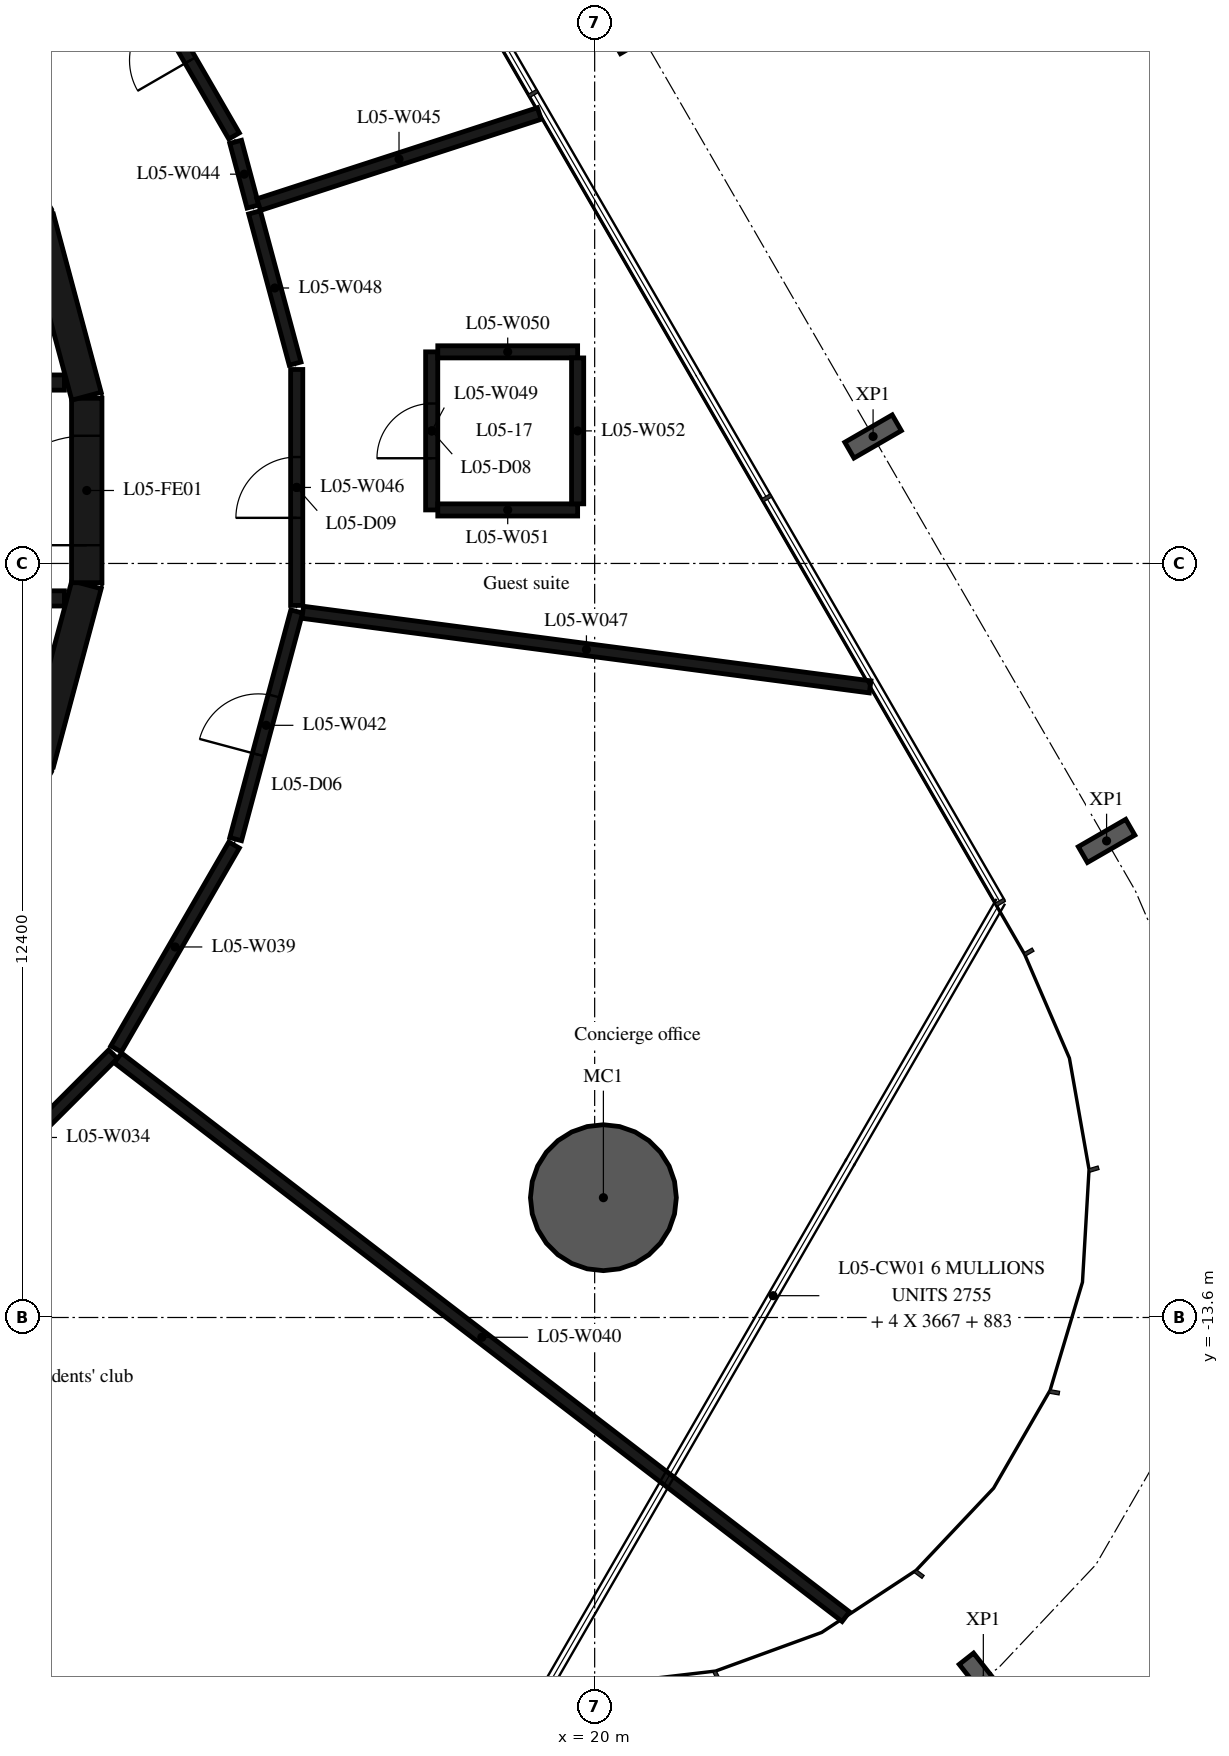
"""IFC4 building model, lengths in metres.
Left out: names, types, materials, properties, quantities, classifications, styles, units other than length and angle.
Written with IfcOpenShell. Run it as: python <this file> out.ifc"""

import sys

from ifc_helpers import new_model, si_unit, direction, frame, frame_2d, origin, origin_2d, place, context, subcontext, project, spatial, rectangle, hollow_circle, i_section, extrude, element, fill, save


model = new_model("IFC4")
c1 = context("Model", 3, precision=1e-05, world=origin(), true_north=direction((0.0, 1.0)))
c2 = subcontext(c1, "Body", "Model", "MODEL_VIEW")
j1 = project(units=[si_unit("LENGTHUNIT", "METRE"), si_unit("PLANEANGLEUNIT", "RADIAN")], contexts=[c1])
p1 = place(None, origin())
s1 = spatial("IfcSite", under=j1, at=p1, CompositionType="ELEMENT")
p2 = place(p1, origin())
s2 = spatial("IfcBuilding", under=s1, at=p2, CompositionType="ELEMENT")
p3 = place(p2, frame((0.0, 0.0, 28.2)))
s3 = spatial("IfcBuildingStorey", under=s2, at=p3, CompositionType="ELEMENT", Elevation=28.2)
p4 = place(p3, frame((20.144, -11.63, -0.38), z_axis=(0.0, 0.0, 1.0), x_axis=(1.0, 0.0, 0.0)))
e1 = element("IfcColumn", 1, at=p4, inside=s3, PredefinedType="COLUMN", context=c2, shape_type="SweptSolid", body=[
    extrude(hollow_circle(Radius=1.2, WallThickness=0.06, at=origin_2d()), origin(), (0.0, 0.0, 1.0), 4.73),
])
for number, where, z_axis, x_axis in (
    (2, (26.392, -19.565, -0.38), (0.0, 0.0, 1.0), (-0.786, -0.619, 0.0)),
    (3, (28.419, -5.763, -0.38), (0.0, 0.0, 1.0), (0.5, -0.866, 0.0)),
    (4, (24.579, 0.888, -0.38), (0.0, 0.0, 1.0), (0.5, -0.866, 0.0)),
    (5, (20.739, 7.539, -0.38), (0.0, 0.0, 1.0), (0.5, -0.866, 0.0)),
):
    element("IfcColumn", number, at=place(p3, frame(where, z_axis=z_axis, x_axis=x_axis)), inside=s3, PredefinedType="COLUMN", context=c2, shape_type="SweptSolid", body=[
        extrude(i_section(OverallWidth=0.3, OverallDepth=0.9, WebThickness=0.019, FlangeThickness=0.035, FilletRadius=0.03, at=origin_2d()), origin(), (0.0, 0.0, 1.0), 4.73),
    ])
p5 = place(p3, frame((10.858, -4.479, 0.0), z_axis=(0.0, 0.0, 1.0), x_axis=(0.258734743916, 0.965948410781, 0.0)))
e6 = element("IfcWall", 6, at=p5, inside=s3, PredefinedType="SHEAR", context=c2, shape_type="SweptSolid", body=[
    extrude(rectangle(XDim=3.033, YDim=0.5, at=frame_2d((1.516, 0.0))), origin(), (0.0, 0.0, 1.0), 4.35),
])
p6 = place(p3, frame((11.647, -1.516, 0.0), z_axis=(0.0, 0.0, 1.0), x_axis=(0.0, 1.0, 0.0)))
e7 = element("IfcWall", 7, at=p6, inside=s3, PredefinedType="SHEAR", context=c2, shape_type="SweptSolid", body=[
    extrude(rectangle(XDim=3.033, YDim=0.5, at=frame_2d((1.516, 0.0))), origin(), (0.0, 0.0, 1.0), 4.35),
])
p7 = place(p6, frame((0.616, 0.0, 0.0)))
e8 = element("IfcOpeningElement", 8, at=p7, cuts=e7, PredefinedType="OPENING", context=c2, shape_type="SweptSolid", body=[
    extrude(rectangle(XDim=1.8, YDim=2.1, at=frame_2d((0.9, 1.05))), frame((0.0, 0.26, 0.0), z_axis=(0.0, -1.0, 0.0), x_axis=(1.0, 0.0, 0.0)), (0.0, 0.0, 1.0), 0.52),
])
p8 = place(p3, frame((11.643, 1.55, 0.0), z_axis=(0.0, 0.0, 1.0), x_axis=(-0.258734743916, 0.965948410781, 0.0)))
e9 = element("IfcWall", 9, at=p8, inside=s3, PredefinedType="SHEAR", context=c2, shape_type="SweptSolid", body=[
    extrude(rectangle(XDim=3.033, YDim=0.5, at=frame_2d((1.516, 0.0))), origin(), (0.0, 0.0, 1.0), 4.35),
])
p9 = place(p3, frame((3.35, 1.775, 0.0), z_axis=(0.0, 0.0, 1.0), x_axis=(1.0, 0.0, 0.0)))
e10 = element("IfcWall", 10, at=p9, inside=s3, PredefinedType="SHEAR", context=c2, shape_type="SweptSolid", body=[
    extrude(rectangle(XDim=7.93, YDim=0.25, at=frame_2d((3.965, 0.0))), origin(), (0.0, 0.0, 1.0), 4.35),
])
p10 = place(p9, frame((0.35, 0.0, 0.0)))
e11 = element("IfcOpeningElement", 11, at=p10, cuts=e10, PredefinedType="OPENING", context=c2, shape_type="SweptSolid", body=[
    extrude(rectangle(XDim=1.2, YDim=2.4, at=frame_2d((0.6, 1.2))), frame((0.0, 0.135, 0.0), z_axis=(0.0, -1.0, 0.0), x_axis=(1.0, 0.0, 0.0)), (0.0, 0.0, 1.0), 0.27),
])
p11 = place(p9, frame((2.5, 0.0, 0.0)))
e12 = element("IfcOpeningElement", 12, at=p11, cuts=e10, PredefinedType="OPENING", context=c2, shape_type="SweptSolid", body=[
    extrude(rectangle(XDim=1.2, YDim=2.4, at=frame_2d((0.6, 1.2))), frame((0.0, 0.135, 0.0), z_axis=(0.0, -1.0, 0.0), x_axis=(1.0, 0.0, 0.0)), (0.0, 0.0, 1.0), 0.27),
])
p12 = place(p9, frame((4.8, 0.0, 0.0)))
e13 = element("IfcOpeningElement", 13, at=p12, cuts=e10, PredefinedType="OPENING", context=c2, shape_type="SweptSolid", body=[
    extrude(rectangle(XDim=0.9, YDim=2.1, at=frame_2d((0.45, 1.05))), frame((0.0, 0.135, 0.0), z_axis=(0.0, -1.0, 0.0), x_axis=(1.0, 0.0, 0.0)), (0.0, 0.0, 1.0), 0.27),
])
p13 = place(p3, frame((3.35, -1.775, 0.0), z_axis=(0.0, 0.0, 1.0), x_axis=(1.0, 0.0, 0.0)))
e14 = element("IfcWall", 14, at=p13, inside=s3, PredefinedType="SHEAR", context=c2, shape_type="SweptSolid", body=[
    extrude(rectangle(XDim=7.93, YDim=0.25, at=frame_2d((3.965, 0.0))), origin(), (0.0, 0.0, 1.0), 4.35),
])
p14 = place(p13, frame((0.4, 0.0, 0.0)))
e15 = element("IfcOpeningElement", 15, at=p14, cuts=e14, PredefinedType="OPENING", context=c2, shape_type="SweptSolid", body=[
    extrude(rectangle(XDim=1.1, YDim=2.4, at=frame_2d((0.55, 1.2))), frame((0.0, 0.135, 0.0), z_axis=(0.0, -1.0, 0.0), x_axis=(1.0, 0.0, 0.0)), (0.0, 0.0, 1.0), 0.27),
])
p15 = place(p13, frame((2.55, 0.0, 0.0)))
e16 = element("IfcOpeningElement", 16, at=p15, cuts=e14, PredefinedType="OPENING", context=c2, shape_type="SweptSolid", body=[
    extrude(rectangle(XDim=1.1, YDim=2.4, at=frame_2d((0.55, 1.2))), frame((0.0, 0.135, 0.0), z_axis=(0.0, -1.0, 0.0), x_axis=(1.0, 0.0, 0.0)), (0.0, 0.0, 1.0), 0.27),
])
p16 = place(p13, frame((4.7, 0.0, 0.0)))
e17 = element("IfcOpeningElement", 17, at=p16, cuts=e14, PredefinedType="OPENING", context=c2, shape_type="SweptSolid", body=[
    extrude(rectangle(XDim=1.1, YDim=2.4, at=frame_2d((0.55, 1.2))), frame((0.0, 0.135, 0.0), z_axis=(0.0, -1.0, 0.0), x_axis=(1.0, 0.0, 0.0)), (0.0, 0.0, 1.0), 0.27),
])
p17 = place(p3, frame((9.341, -12.009, 0.0), z_axis=(0.0, 0.0, 1.0), x_axis=(0.707106781187, 0.707106781187, 0.0)))
e18 = element("IfcWall", 18, at=p17, inside=s3, PredefinedType="PARTITIONING", context=c2, shape_type="SweptSolid", body=[
    extrude(rectangle(XDim=3.874, YDim=0.2, at=frame_2d((1.937, 0.0))), origin(), (0.0, 0.0, 1.0), 4.35),
])
p18 = place(p3, frame((12.13, -9.183, 0.0), z_axis=(0.0, 0.0, 1.0), x_axis=(0.500760497952, 0.865585884642, 0.0)))
e19 = element("IfcWall", 19, at=p18, inside=s3, PredefinedType="PARTITIONING", context=c2, shape_type="SweptSolid", body=[
    extrude(rectangle(XDim=3.874, YDim=0.2, at=frame_2d((1.937, 0.0))), origin(), (0.0, 0.0, 1.0), 4.35),
])
p19 = place(p3, frame((12.159, -9.331, 0.0), z_axis=(0.0, 0.0, 1.0), x_axis=(0.793226820575, -0.608926277246, 0.0)))
e20 = element("IfcWall", 20, at=p19, inside=s3, PredefinedType="PARTITIONING", context=c2, shape_type="SweptSolid", body=[
    extrude(rectangle(XDim=15.091, YDim=0.2, at=frame_2d((7.545, 0.0))), origin(), (0.0, 0.0, 1.0), 4.35),
])
p20 = place(p3, frame((14.096, -5.733, 0.0), z_axis=(0.0, 0.0, 1.0), x_axis=(0.259085569159, 0.96585437197, 0.0)))
e21 = element("IfcWall", 21, at=p20, inside=s3, PredefinedType="PARTITIONING", context=c2, shape_type="SweptSolid", body=[
    extrude(rectangle(XDim=3.876, YDim=0.2, at=frame_2d((1.938, 0.0))), origin(), (0.0, 0.0, 1.0), 4.35),
])
p21 = place(p20, frame((1.438, 0.0, 0.0)))
e22 = element("IfcOpeningElement", 22, at=p21, cuts=e21, PredefinedType="OPENING", context=c2, shape_type="SweptSolid", body=[
    extrude(rectangle(XDim=1.0, YDim=2.1, at=frame_2d((0.5, 1.05))), frame((0.0, 0.11, 0.0), z_axis=(0.0, -1.0, 0.0), x_axis=(1.0, 0.0, 0.0)), (0.0, 0.0, 1.0), 0.22),
])
p22 = place(p3, frame((14.07, 5.83, 0.0), z_axis=(0.0, 0.0, 1.0), x_axis=(-0.500760497952, 0.865585884642, 0.0)))
e23 = element("IfcWall", 23, at=p22, inside=s3, PredefinedType="PARTITIONING", context=c2, shape_type="SweptSolid", body=[
    extrude(rectangle(XDim=3.874, YDim=0.2, at=frame_2d((1.937, 0.0))), origin(), (0.0, 0.0, 1.0), 4.35),
])
p23 = place(p22, frame((1.437, 0.0, 0.0)))
e24 = element("IfcOpeningElement", 24, at=p23, cuts=e23, PredefinedType="OPENING", context=c2, shape_type="SweptSolid", body=[
    extrude(rectangle(XDim=1.0, YDim=2.1, at=frame_2d((0.5, 1.05))), frame((0.0, 0.11, 0.0), z_axis=(0.0, -1.0, 0.0), x_axis=(1.0, 0.0, 0.0)), (0.0, 0.0, 1.0), 0.22),
])
p24 = place(p3, frame((14.38, 4.67, 0.0), z_axis=(0.0, 0.0, 1.0), x_axis=(-0.258159565639, 0.966102292032, 0.0)))
e25 = element("IfcWall", 25, at=p24, inside=s3, PredefinedType="PARTITIONING", context=c2, shape_type="SweptSolid", body=[
    extrude(rectangle(XDim=1.101, YDim=0.2, at=frame_2d((0.55, 0.0))), origin(), (0.0, 0.0, 1.0), 4.35),
])
p25 = place(p3, frame((14.475, 4.701, 0.0), z_axis=(0.0, 0.0, 1.0), x_axis=(0.951085450377, 0.308927930239, 0.0)))
e26 = element("IfcWall", 26, at=p25, inside=s3, PredefinedType="PARTITIONING", context=c2, shape_type="SweptSolid", body=[
    extrude(rectangle(XDim=4.852, YDim=0.2, at=frame_2d((2.426, 0.0))), origin(), (0.0, 0.0, 1.0), 3.96),
])
p26 = place(p3, frame((15.1, -1.89, 0.0), z_axis=(0.0, 0.0, 1.0), x_axis=(0.0, 1.0, 0.0)))
e27 = element("IfcWall", 27, at=p26, inside=s3, PredefinedType="PARTITIONING", context=c2, shape_type="SweptSolid", body=[
    extrude(rectangle(XDim=3.88, YDim=0.2, at=frame_2d((1.94, 0.0))), origin(), (0.0, 0.0, 1.0), 4.35),
])
p27 = place(p26, frame((1.44, 0.0, 0.0)))
e28 = element("IfcOpeningElement", 28, at=p27, cuts=e27, PredefinedType="OPENING", context=c2, shape_type="SweptSolid", body=[
    extrude(rectangle(XDim=1.0, YDim=2.1, at=frame_2d((0.5, 1.05))), frame((0.0, 0.11, 0.0), z_axis=(0.0, -1.0, 0.0), x_axis=(1.0, 0.0, 0.0)), (0.0, 0.0, 1.0), 0.22),
])
p28 = place(p3, frame((15.199, -2.003, 0.0), z_axis=(0.0, 0.0, 1.0), x_axis=(0.991463740717, -0.130382709146, 0.0)))
e29 = element("IfcWall", 29, at=p28, inside=s3, PredefinedType="PARTITIONING", context=c2, shape_type="SweptSolid", body=[
    extrude(rectangle(XDim=9.411, YDim=0.2, at=frame_2d((4.706, 0.0))), origin(), (0.0, 0.0, 1.0), 4.35),
])
p29 = place(p3, frame((15.074, 2.087, 0.0), z_axis=(0.0, 0.0, 1.0), x_axis=(-0.259408996071, 0.965767556277, 0.0)))
e30 = element("IfcWall", 30, at=p29, inside=s3, PredefinedType="PARTITIONING", context=c2, shape_type="SweptSolid", body=[
    extrude(rectangle(XDim=2.575, YDim=0.2, at=frame_2d((1.288, 0.0))), origin(), (0.0, 0.0, 1.0), 4.35),
])
p30 = place(p3, frame((17.32, -0.32, 0.0), z_axis=(0.0, 0.0, 1.0), x_axis=(0.0, 1.0, 0.0)))
e31 = element("IfcWall", 31, at=p30, inside=s3, PredefinedType="PARTITIONING", context=c2, shape_type="SweptSolid", body=[
    extrude(rectangle(XDim=2.6, YDim=0.2, at=frame_2d((1.3, 0.0))), origin(), (0.0, 0.0, 1.0), 4.35),
])
p31 = place(p30, frame((0.85, 0.0, 0.0)))
e32 = element("IfcOpeningElement", 32, at=p31, cuts=e31, PredefinedType="OPENING", context=c2, shape_type="SweptSolid", body=[
    extrude(rectangle(XDim=0.9, YDim=2.1, at=frame_2d((0.45, 1.05))), frame((0.0, 0.11, 0.0), z_axis=(0.0, -1.0, 0.0), x_axis=(1.0, 0.0, 0.0)), (0.0, 0.0, 1.0), 0.22),
])
for number, where, z_axis, x_axis in (
    (33, (17.42, 2.28, 0.0), (0.0, 0.0, 1.0), (1.0, 0.0, 0.0)),
    (34, (19.72, -0.32, 0.0), (0.0, 0.0, 1.0), (-1.0, 0.0, 0.0)),
):
    element("IfcWall", number, at=place(p3, frame(where, z_axis=z_axis, x_axis=x_axis)), inside=s3, PredefinedType="PARTITIONING", context=c2, shape_type="SweptSolid", body=[
        extrude(rectangle(XDim=2.3, YDim=0.2, at=frame_2d((1.15, 0.0))), origin(), (0.0, 0.0, 1.0), 4.35),
    ])
p32 = place(p3, frame((19.72, 2.18, 0.0), z_axis=(0.0, 0.0, 1.0), x_axis=(0.0, -1.0, 0.0)))
e35 = element("IfcWall", 35, at=p32, inside=s3, PredefinedType="PARTITIONING", context=c2, shape_type="SweptSolid", body=[
    extrude(rectangle(XDim=2.4, YDim=0.2, at=frame_2d((1.2, 0.0))), origin(), (0.0, 0.0, 1.0), 4.35),
])
p33 = place(p7, origin())
e36 = element("IfcDoor", 36, at=p33, inside=s3, OperationType="DOUBLE_DOOR_SINGLE_SWING", PredefinedType="DOOR", context=c2, shape_type="SweptSolid", body=[
    extrude(rectangle(XDim=1.8, YDim=2.1, at=frame_2d((0.9, 1.05))), frame((0.0, 0.025, 0.0), z_axis=(0.0, -1.0, 0.0), x_axis=(1.0, 0.0, 0.0)), (0.0, 0.0, 1.0), 0.05),
])
fill(e8, e36)
p34 = place(p21, origin())
e37 = element("IfcDoor", 37, at=p34, inside=s3, OperationType="SINGLE_SWING_LEFT", PredefinedType="DOOR", context=c2, shape_type="SweptSolid", body=[
    extrude(rectangle(XDim=1.0, YDim=2.1, at=frame_2d((0.5, 1.05))), frame((0.0, 0.025, 0.0), z_axis=(0.0, -1.0, 0.0), x_axis=(1.0, 0.0, 0.0)), (0.0, 0.0, 1.0), 0.05),
])
fill(e22, e37)
p35 = place(p31, origin())
e38 = element("IfcDoor", 38, at=p35, inside=s3, OperationType="SINGLE_SWING_LEFT", PredefinedType="DOOR", context=c2, shape_type="SweptSolid", body=[
    extrude(rectangle(XDim=0.9, YDim=2.1, at=frame_2d((0.45, 1.05))), frame((0.0, 0.025, 0.0), z_axis=(0.0, -1.0, 0.0), x_axis=(1.0, 0.0, 0.0)), (0.0, 0.0, 1.0), 0.05),
])
fill(e32, e38)
p36 = place(p27, origin())
e39 = element("IfcDoor", 39, at=p36, inside=s3, OperationType="SINGLE_SWING_LEFT", PredefinedType="DOOR", context=c2, shape_type="SweptSolid", body=[
    extrude(rectangle(XDim=1.0, YDim=2.1, at=frame_2d((0.5, 1.05))), frame((0.0, 0.025, 0.0), z_axis=(0.0, -1.0, 0.0), x_axis=(1.0, 0.0, 0.0)), (0.0, 0.0, 1.0), 0.05),
])
fill(e28, e39)
p37 = place(p23, origin())
e40 = element("IfcDoor", 40, at=p37, inside=s3, OperationType="SINGLE_SWING_LEFT", PredefinedType="DOOR", context=c2, shape_type="SweptSolid", body=[
    extrude(rectangle(XDim=1.0, YDim=2.1, at=frame_2d((0.5, 1.05))), frame((0.0, 0.025, 0.0), z_axis=(0.0, -1.0, 0.0), x_axis=(1.0, 0.0, 0.0)), (0.0, 0.0, 1.0), 0.05),
])
fill(e24, e40)
save(model, sys.argv[1])
